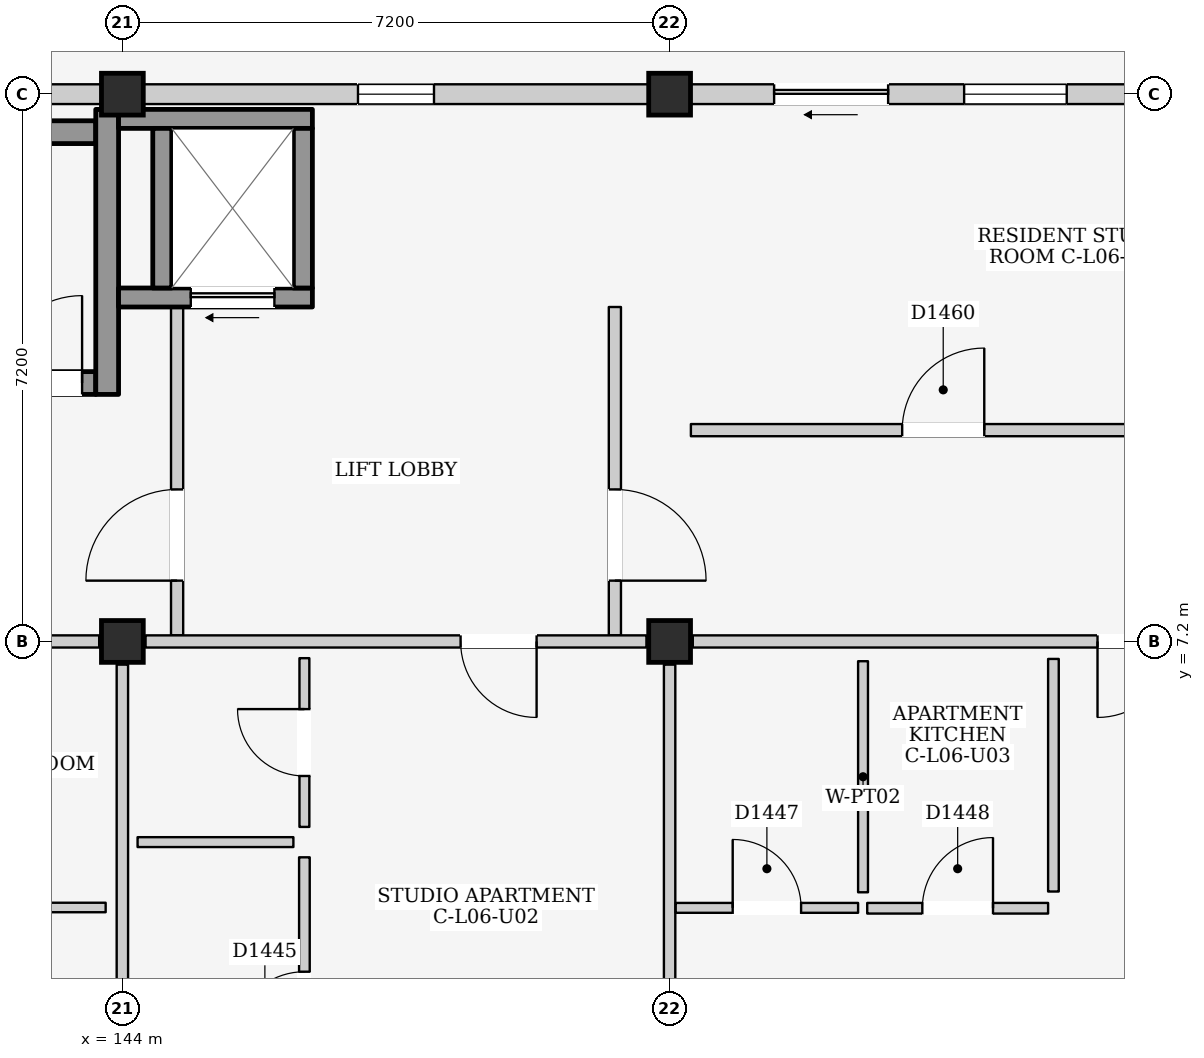
"""IFC4 building model, lengths in metres.
Left out: names, types, materials, properties, quantities, classifications, styles, units other than length and angle.
Written with IfcOpenShell. Run it as: python <this file> out.ifc"""

import sys

from ifc_helpers import new_model, si_unit, direction, frame, frame_2d, origin, origin_2d, place, context, subcontext, project, spatial, rectangle, extrude, element, fill, save


model = new_model("IFC4")
c1 = context("Model", 3, precision=1e-05, world=origin(), true_north=direction((0.0, 1.0)))
c2 = subcontext(c1, "Body", "Model", "MODEL_VIEW")
j1 = project(units=[si_unit("LENGTHUNIT", "METRE"), si_unit("PLANEANGLEUNIT", "RADIAN")], contexts=[c1])
p1 = place(None, origin())
s1 = spatial("IfcSite", under=j1, at=p1, CompositionType="ELEMENT")
p2 = place(p1, origin())
s2 = spatial("IfcBuilding", under=s1, at=p2, CompositionType="ELEMENT")
p3 = place(p2, frame((0.0, 0.0, 21.9)))
s3 = spatial("IfcBuildingStorey", under=s2, at=p3, CompositionType="ELEMENT", Elevation=21.9)
for number, where, z_axis, x_axis in (
    (1, (144.0, 7.2, 0.0), (0.0, 0.0, 1.0), (1.0, 0.0, 0.0)),
    (2, (144.0, 14.4, 0.0), (0.0, 0.0, 1.0), (1.0, 0.0, 0.0)),
    (3, (151.2, 7.2, 0.0), (0.0, 0.0, 1.0), (1.0, 0.0, 0.0)),
    (4, (151.2, 14.4, 0.0), (0.0, 0.0, 1.0), (1.0, 0.0, 0.0)),
):
    element("IfcColumn", number, at=place(p3, frame(where, z_axis=z_axis, x_axis=x_axis)), inside=s3, PredefinedType="COLUMN", context=c2, shape_type="SweptSolid", body=[
        extrude(rectangle(XDim=0.55, YDim=0.55, at=origin_2d()), origin(), (0.0, 0.0, 1.0), 3.2),
    ])
p4 = place(p3, frame((137.075, 14.4, 0.0), z_axis=(0.0, 0.0, 1.0), x_axis=(1.0, 0.0, 0.0)))
e5 = element("IfcWall", 5, at=p4, inside=s3, PredefinedType="ELEMENTEDWALL", context=c2, shape_type="SweptSolid", body=[
    extrude(rectangle(XDim=6.65, YDim=0.26, at=frame_2d((3.325, 0.0))), origin(), (0.0, 0.0, 1.0), 2.365),
])
p5 = place(p4, frame((2.825, 0.0, 1.2)))
e6 = element("IfcOpeningElement", 6, at=p5, cuts=e5, PredefinedType="OPENING", context=c2, shape_type="SweptSolid", body=[
    extrude(rectangle(XDim=1.0, YDim=0.9, at=frame_2d((0.5, 0.45))), frame((0.0, 0.145, 0.0), z_axis=(0.0, -1.0, 0.0), x_axis=(1.0, 0.0, 0.0)), (0.0, 0.0, 1.0), 0.29),
])
p6 = place(p3, frame((144.275, 14.4, 0.0), z_axis=(0.0, 0.0, 1.0), x_axis=(1.0, 0.0, 0.0)))
e7 = element("IfcWall", 7, at=p6, inside=s3, PredefinedType="ELEMENTEDWALL", context=c2, shape_type="SweptSolid", body=[
    extrude(rectangle(XDim=6.65, YDim=0.26, at=frame_2d((3.325, 0.0))), origin(), (0.0, 0.0, 1.0), 2.365),
])
p7 = place(p6, frame((2.825, 0.0, 1.2)))
e8 = element("IfcOpeningElement", 8, at=p7, cuts=e7, PredefinedType="OPENING", context=c2, shape_type="SweptSolid", body=[
    extrude(rectangle(XDim=1.0, YDim=0.9, at=frame_2d((0.5, 0.45))), frame((0.0, 0.145, 0.0), z_axis=(0.0, -1.0, 0.0), x_axis=(1.0, 0.0, 0.0)), (0.0, 0.0, 1.0), 0.29),
])
p8 = place(p3, frame((151.475, 14.4, 0.0), z_axis=(0.0, 0.0, 1.0), x_axis=(1.0, 0.0, 0.0)))
e9 = element("IfcWall", 9, at=p8, inside=s3, PredefinedType="ELEMENTEDWALL", context=c2, shape_type="SweptSolid", body=[
    extrude(rectangle(XDim=6.65, YDim=0.26, at=frame_2d((3.325, 0.0))), origin(), (0.0, 0.0, 1.0), 2.365),
])
p9 = place(p8, frame((1.1, 0.0, 0.0)))
e10 = element("IfcOpeningElement", 10, at=p9, cuts=e9, PredefinedType="OPENING", context=c2, shape_type="SweptSolid", body=[
    extrude(rectangle(XDim=1.5, YDim=2.12, at=frame_2d((0.75, 1.06))), frame((0.0, 0.145, 0.0), z_axis=(0.0, -1.0, 0.0), x_axis=(1.0, 0.0, 0.0)), (0.0, 0.0, 1.0), 0.29),
])
p10 = place(p8, frame((3.6, 0.0, 0.755)))
e11 = element("IfcOpeningElement", 11, at=p10, cuts=e9, PredefinedType="OPENING", context=c2, shape_type="SweptSolid", body=[
    extrude(rectangle(XDim=1.35, YDim=1.5, at=frame_2d((0.675, 0.75))), frame((0.0, 0.145, 0.0), z_axis=(0.0, -1.0, 0.0), x_axis=(1.0, 0.0, 0.0)), (0.0, 0.0, 1.0), 0.29),
])
p11 = place(p3, frame((137.15, 10.6, 0.0), z_axis=(0.0, 0.0, 1.0), x_axis=(1.0, 0.0, 0.0)))
e12 = element("IfcWall", 12, at=p11, inside=s3, PredefinedType="SHEAR", context=c2, shape_type="SweptSolid", body=[
    extrude(rectangle(XDim=6.5, YDim=0.3, at=frame_2d((3.25, 0.0))), origin(), (0.0, 0.0, 1.0), 2.98),
])
p12 = place(p11, frame((5.17, 0.0, 0.0)))
e13 = element("IfcOpeningElement", 13, at=p12, cuts=e12, PredefinedType="OPENING", context=c2, shape_type="SweptSolid", body=[
    extrude(rectangle(XDim=1.15, YDim=2.2, at=frame_2d((0.575, 1.1))), frame((0.0, 0.165, 0.0), z_axis=(0.0, -1.0, 0.0), x_axis=(1.0, 0.0, 0.0)), (0.0, 0.0, 1.0), 0.33),
])
p13 = place(p3, frame((137.15, 13.9, 0.0), z_axis=(0.0, 0.0, 1.0), x_axis=(1.0, 0.0, 0.0)))
e14 = element("IfcWall", 14, at=p13, inside=s3, PredefinedType="SHEAR", context=c2, shape_type="SweptSolid", body=[
    extrude(rectangle(XDim=6.5, YDim=0.3, at=frame_2d((3.25, 0.0))), origin(), (0.0, 0.0, 1.0), 2.98),
])
p14 = place(p3, frame((143.8, 10.45, 0.0), z_axis=(0.0, 0.0, 1.0), x_axis=(0.0, 1.0, 0.0)))
e15 = element("IfcWall", 15, at=p14, inside=s3, PredefinedType="SHEAR", context=c2, shape_type="SweptSolid", body=[
    extrude(rectangle(XDim=3.75, YDim=0.3, at=frame_2d((1.875, 0.0))), origin(), (0.0, 0.0, 1.0), 2.98),
])
p15 = place(p3, frame((144.72, 7.28, 0.0), z_axis=(0.0, 0.0, 1.0), x_axis=(0.0, 1.0, 0.0)))
e16 = element("IfcWall", 16, at=p15, inside=s3, PredefinedType="PARTITIONING", context=c2, shape_type="SweptSolid", body=[
    extrude(rectangle(XDim=4.32, YDim=0.16, at=frame_2d((2.16, 0.0))), origin(), (0.0, 0.0, 1.0), 2.98),
])
p16 = place(p15, frame((0.72, 0.0, 0.0)))
e17 = element("IfcOpeningElement", 17, at=p16, cuts=e16, PredefinedType="OPENING", context=c2, shape_type="SweptSolid", body=[
    extrude(rectangle(XDim=1.2, YDim=2.2, at=frame_2d((0.6, 1.1))), frame((0.0, 0.095, 0.0), z_axis=(0.0, -1.0, 0.0), x_axis=(1.0, 0.0, 0.0)), (0.0, 0.0, 1.0), 0.19),
])
p17 = place(p3, frame((150.48, 7.28, 0.0), z_axis=(0.0, 0.0, 1.0), x_axis=(0.0, 1.0, 0.0)))
e18 = element("IfcWall", 18, at=p17, inside=s3, PredefinedType="PARTITIONING", context=c2, shape_type="SweptSolid", body=[
    extrude(rectangle(XDim=4.32, YDim=0.16, at=frame_2d((2.16, 0.0))), origin(), (0.0, 0.0, 1.0), 2.98),
])
p18 = place(p17, frame((0.72, 0.0, 0.0)))
e19 = element("IfcOpeningElement", 19, at=p18, cuts=e18, PredefinedType="OPENING", context=c2, shape_type="SweptSolid", body=[
    extrude(rectangle(XDim=1.2, YDim=2.2, at=frame_2d((0.6, 1.1))), frame((0.0, 0.095, 0.0), z_axis=(0.0, -1.0, 0.0), x_axis=(1.0, 0.0, 0.0)), (0.0, 0.0, 1.0), 0.19),
])
p19 = place(p3, frame((143.95, 11.725, 0.0), z_axis=(0.0, 0.0, 1.0), x_axis=(1.0, 0.0, 0.0)))
e20 = element("IfcWall", 20, at=p19, inside=s3, PredefinedType="SHEAR", context=c2, shape_type="SweptSolid", body=[
    extrude(rectangle(XDim=2.55, YDim=0.25, at=frame_2d((1.275, 0.0))), origin(), (0.0, 0.0, 1.0), 2.98),
])
p20 = place(p19, frame((0.95, 0.0, 0.0)))
e21 = element("IfcOpeningElement", 21, at=p20, cuts=e20, PredefinedType="OPENING", context=c2, shape_type="SweptSolid", body=[
    extrude(rectangle(XDim=1.1, YDim=2.15, at=frame_2d((0.55, 1.075))), frame((0.0, 0.14, 0.0), z_axis=(0.0, -1.0, 0.0), x_axis=(1.0, 0.0, 0.0)), (0.0, 0.0, 1.0), 0.28),
])
p21 = place(p3, frame((143.95, 14.075, 0.0), z_axis=(0.0, 0.0, 1.0), x_axis=(1.0, 0.0, 0.0)))
e22 = element("IfcWall", 22, at=p21, inside=s3, PredefinedType="SHEAR", context=c2, shape_type="SweptSolid", body=[
    extrude(rectangle(XDim=2.55, YDim=0.25, at=frame_2d((1.275, 0.0))), origin(), (0.0, 0.0, 1.0), 2.98),
])
for number, where, z_axis, x_axis in (
    (23, (144.525, 11.85, 0.0), (0.0, 0.0, 1.0), (0.0, 1.0, 0.0)),
    (24, (146.375, 11.85, 0.0), (0.0, 0.0, 1.0), (0.0, 1.0, 0.0)),
):
    element("IfcWall", number, at=place(p3, frame(where, z_axis=z_axis, x_axis=x_axis)), inside=s3, PredefinedType="SHEAR", context=c2, shape_type="SweptSolid", body=[
        extrude(rectangle(XDim=2.1, YDim=0.25, at=frame_2d((1.05, 0.0))), origin(), (0.0, 0.0, 1.0), 2.98),
    ])
p22 = place(p3, frame((137.105, 7.2, 0.0), z_axis=(0.0, 0.0, 1.0), x_axis=(1.0, 0.0, 0.0)))
e25 = element("IfcWall", 25, at=p22, inside=s3, PredefinedType="PARTITIONING", context=c2, shape_type="SweptSolid", body=[
    extrude(rectangle(XDim=6.59, YDim=0.16, at=frame_2d((3.295, 0.0))), origin(), (0.0, 0.0, 1.0), 2.365),
])
p23 = place(p3, frame((144.0, 0.305, 0.0), z_axis=(0.0, 0.0, 1.0), x_axis=(0.0, 1.0, 0.0)))
e26 = element("IfcWall", 26, at=p23, inside=s3, PredefinedType="PARTITIONING", context=c2, shape_type="SweptSolid", body=[
    extrude(rectangle(XDim=6.59, YDim=0.15, at=frame_2d((3.295, 0.0))), origin(), (0.0, 0.0, 1.0), 2.465),
])
p24 = place(p3, frame((139.72, 3.7, 0.0), z_axis=(0.0, 0.0, 1.0), x_axis=(1.0, 0.0, 0.0)))
e27 = element("IfcWall", 27, at=p24, inside=s3, PredefinedType="PARTITIONING", context=c2, shape_type="SweptSolid", body=[
    extrude(rectangle(XDim=4.06, YDim=0.125, at=frame_2d((2.03, 0.0))), origin(), (0.0, 0.0, 1.0), 2.98),
])
p25 = place(p3, frame((144.305, 7.2, 0.0), z_axis=(0.0, 0.0, 1.0), x_axis=(1.0, 0.0, 0.0)))
e28 = element("IfcWall", 28, at=p25, inside=s3, PredefinedType="PARTITIONING", context=c2, shape_type="SweptSolid", body=[
    extrude(rectangle(XDim=6.59, YDim=0.16, at=frame_2d((3.295, 0.0))), origin(), (0.0, 0.0, 1.0), 2.365),
])
p26 = place(p25, frame((4.145, 0.0, 0.0)))
e29 = element("IfcOpeningElement", 29, at=p26, cuts=e28, PredefinedType="OPENING", context=c2, shape_type="SweptSolid", body=[
    extrude(rectangle(XDim=1.0, YDim=2.15, at=frame_2d((0.5, 1.075))), frame((0.0, 0.095, 0.0), z_axis=(0.0, -1.0, 0.0), x_axis=(1.0, 0.0, 0.0)), (0.0, 0.0, 1.0), 0.19),
])
p27 = place(p3, frame((151.2, 0.305, 0.0), z_axis=(0.0, 0.0, 1.0), x_axis=(0.0, 1.0, 0.0)))
e30 = element("IfcWall", 30, at=p27, inside=s3, PredefinedType="PARTITIONING", context=c2, shape_type="SweptSolid", body=[
    extrude(rectangle(XDim=6.59, YDim=0.15, at=frame_2d((3.295, 0.0))), origin(), (0.0, 0.0, 1.0), 2.465),
])
p28 = place(p3, frame((144.2, 4.56, 0.0), z_axis=(0.0, 0.0, 1.0), x_axis=(1.0, 0.0, 0.0)))
e31 = element("IfcWall", 31, at=p28, inside=s3, PredefinedType="PARTITIONING", context=c2, shape_type="SweptSolid", body=[
    extrude(rectangle(XDim=2.05, YDim=0.13, at=frame_2d((1.025, 0.0))), origin(), (0.0, 0.0, 1.0), 2.98),
])
p29 = place(p3, frame((146.395, 4.76, 0.0), z_axis=(0.0, 0.0, 1.0), x_axis=(0.0, 1.0, 0.0)))
e32 = element("IfcWall", 32, at=p29, inside=s3, PredefinedType="PARTITIONING", context=c2, shape_type="SweptSolid", body=[
    extrude(rectangle(XDim=2.22, YDim=0.13, at=frame_2d((1.11, 0.0))), origin(), (0.0, 0.0, 1.0), 2.98),
])
p30 = place(p29, frame((0.67, 0.0, 0.0)))
e33 = element("IfcOpeningElement", 33, at=p30, cuts=e32, PredefinedType="OPENING", context=c2, shape_type="SweptSolid", body=[
    extrude(rectangle(XDim=0.88, YDim=2.1, at=frame_2d((0.44, 1.05))), frame((0.0, 0.08, 0.0), z_axis=(0.0, -1.0, 0.0), x_axis=(1.0, 0.0, 0.0)), (0.0, 0.0, 1.0), 0.16),
])
p31 = place(p3, frame((146.395, 0.42, 0.0), z_axis=(0.0, 0.0, 1.0), x_axis=(0.0, 1.0, 0.0)))
e34 = element("IfcWall", 34, at=p31, inside=s3, PredefinedType="PARTITIONING", context=c2, shape_type="SweptSolid", body=[
    extrude(rectangle(XDim=3.94, YDim=0.14, at=frame_2d((1.97, 0.0))), origin(), (0.0, 0.0, 1.0), 2.98),
])
p32 = place(p31, frame((1.505, 0.0, 0.0)))
e35 = element("IfcOpeningElement", 35, at=p32, cuts=e34, PredefinedType="OPENING", context=c2, shape_type="SweptSolid", body=[
    extrude(rectangle(XDim=0.93, YDim=2.14, at=frame_2d((0.465, 1.07))), frame((0.0, 0.085, 0.0), z_axis=(0.0, -1.0, 0.0), x_axis=(1.0, 0.0, 0.0)), (0.0, 0.0, 1.0), 0.17),
])
p33 = place(p3, frame((151.505, 7.2, 0.0), z_axis=(0.0, 0.0, 1.0), x_axis=(1.0, 0.0, 0.0)))
e36 = element("IfcWall", 36, at=p33, inside=s3, PredefinedType="PARTITIONING", context=c2, shape_type="SweptSolid", body=[
    extrude(rectangle(XDim=6.59, YDim=0.16, at=frame_2d((3.295, 0.0))), origin(), (0.0, 0.0, 1.0), 2.365),
])
p34 = place(p33, frame((5.325, 0.0, 0.0)))
e37 = element("IfcOpeningElement", 37, at=p34, cuts=e36, PredefinedType="OPENING", context=c2, shape_type="SweptSolid", body=[
    extrude(rectangle(XDim=1.0, YDim=2.15, at=frame_2d((0.5, 1.075))), frame((0.0, 0.095, 0.0), z_axis=(0.0, -1.0, 0.0), x_axis=(1.0, 0.0, 0.0)), (0.0, 0.0, 1.0), 0.19),
])
p35 = place(p3, frame((151.28, 3.695, 0.0), z_axis=(0.0, 0.0, 1.0), x_axis=(1.0, 0.0, 0.0)))
e38 = element("IfcWall", 38, at=p35, inside=s3, PredefinedType="PARTITIONING", context=c2, shape_type="SweptSolid", body=[
    extrude(rectangle(XDim=2.4, YDim=0.13, at=frame_2d((1.2, 0.0))), origin(), (0.0, 0.0, 1.0), 2.98),
])
p36 = place(p35, frame((0.75, 0.0, 0.0)))
e39 = element("IfcOpeningElement", 39, at=p36, cuts=e38, PredefinedType="OPENING", context=c2, shape_type="SweptSolid", body=[
    extrude(rectangle(XDim=0.9, YDim=2.1, at=frame_2d((0.45, 1.05))), frame((0.0, 0.08, 0.0), z_axis=(0.0, -1.0, 0.0), x_axis=(1.0, 0.0, 0.0)), (0.0, 0.0, 1.0), 0.16),
])
p37 = place(p3, frame((153.745, 3.9, 0.0), z_axis=(0.0, 0.0, 1.0), x_axis=(0.0, 1.0, 0.0)))
e40 = element("IfcWall", 40, at=p37, inside=s3, PredefinedType="PARTITIONING", context=c2, shape_type="SweptSolid", body=[
    extrude(rectangle(XDim=3.04, YDim=0.13, at=frame_2d((1.52, 0.0))), origin(), (0.0, 0.0, 1.0), 2.98),
])
p38 = place(p3, frame((153.8, 3.69, 0.0), z_axis=(0.0, 0.0, 1.0), x_axis=(1.0, 0.0, 0.0)))
e41 = element("IfcWall", 41, at=p38, inside=s3, PredefinedType="PARTITIONING", context=c2, shape_type="SweptSolid", body=[
    extrude(rectangle(XDim=2.38, YDim=0.14, at=frame_2d((1.19, 0.0))), origin(), (0.0, 0.0, 1.0), 2.98),
])
p39 = place(p38, frame((0.725, 0.0, 0.0)))
e42 = element("IfcOpeningElement", 42, at=p39, cuts=e41, PredefinedType="OPENING", context=c2, shape_type="SweptSolid", body=[
    extrude(rectangle(XDim=0.93, YDim=2.14, at=frame_2d((0.465, 1.07))), frame((0.0, 0.085, 0.0), z_axis=(0.0, -1.0, 0.0), x_axis=(1.0, 0.0, 0.0)), (0.0, 0.0, 1.0), 0.17),
])
p40 = place(p3, frame((156.25, 3.91, 0.0), z_axis=(0.0, 0.0, 1.0), x_axis=(0.0, 1.0, 0.0)))
e43 = element("IfcWall", 43, at=p40, inside=s3, PredefinedType="PARTITIONING", context=c2, shape_type="SweptSolid", body=[
    extrude(rectangle(XDim=3.06, YDim=0.14, at=frame_2d((1.53, 0.0))), origin(), (0.0, 0.0, 1.0), 2.98),
])
p41 = place(p3, frame((151.48, 9.98, 0.0), z_axis=(0.0, 0.0, 1.0), x_axis=(1.0, 0.0, 0.0)))
e44 = element("IfcWall", 44, at=p41, inside=s3, PredefinedType="PARTITIONING", context=c2, shape_type="SweptSolid", body=[
    extrude(rectangle(XDim=6.64, YDim=0.16, at=frame_2d((3.32, 0.0))), origin(), (0.0, 0.0, 1.0), 2.98),
])
p42 = place(p41, frame((2.78, 0.0, 0.0)))
e45 = element("IfcOpeningElement", 45, at=p42, cuts=e44, PredefinedType="OPENING", context=c2, shape_type="SweptSolid", body=[
    extrude(rectangle(XDim=1.08, YDim=2.22, at=frame_2d((0.54, 1.11))), frame((0.0, 0.095, 0.0), z_axis=(0.0, -1.0, 0.0), x_axis=(1.0, 0.0, 0.0)), (0.0, 0.0, 1.0), 0.19),
])
p43 = place(p7, origin())
e46 = element("IfcWindow", 46, at=p43, inside=s3, PartitioningType="SINGLE_PANEL", PredefinedType="WINDOW", context=c2, shape_type="SweptSolid", body=[
    extrude(rectangle(XDim=1.0, YDim=0.9, at=frame_2d((0.5, 0.45))), frame((0.0, 0.03, 0.0), z_axis=(0.0, -1.0, 0.0), x_axis=(1.0, 0.0, 0.0)), (0.0, 0.0, 1.0), 0.06),
])
fill(e8, e46)
p44 = place(p9, frame((1.5, 0.0, 0.0), z_axis=(0.0, 0.0, 1.0), x_axis=(-1.0, 0.0, 0.0)))
e47 = element("IfcDoor", 47, at=p44, inside=s3, OperationType="SLIDING_TO_LEFT", PredefinedType="DOOR", context=c2, shape_type="SweptSolid", body=[
    extrude(rectangle(XDim=1.5, YDim=2.12, at=frame_2d((0.75, 1.06))), frame((0.0, 0.025, 0.0), z_axis=(0.0, -1.0, 0.0), x_axis=(1.0, 0.0, 0.0)), (0.0, 0.0, 1.0), 0.05),
])
fill(e10, e47)
p45 = place(p10, origin())
e48 = element("IfcWindow", 48, at=p45, inside=s3, PartitioningType="SINGLE_PANEL", PredefinedType="WINDOW", context=c2, shape_type="SweptSolid", body=[
    extrude(rectangle(XDim=1.35, YDim=1.5, at=frame_2d((0.675, 0.75))), frame((0.0, 0.03, 0.0), z_axis=(0.0, -1.0, 0.0), x_axis=(1.0, 0.0, 0.0)), (0.0, 0.0, 1.0), 0.06),
])
fill(e11, e48)
p46 = place(p12, origin())
e49 = element("IfcDoor", 49, at=p46, inside=s3, OperationType="SINGLE_SWING_RIGHT", PredefinedType="DOOR", context=c2, shape_type="SweptSolid", body=[
    extrude(rectangle(XDim=1.15, YDim=2.2, at=frame_2d((0.575, 1.1))), frame((0.0, 0.025, 0.0), z_axis=(0.0, -1.0, 0.0), x_axis=(1.0, 0.0, 0.0)), (0.0, 0.0, 1.0), 0.05),
])
fill(e13, e49)
p47 = place(p16, origin())
e50 = element("IfcDoor", 50, at=p47, inside=s3, OperationType="SINGLE_SWING_LEFT", PredefinedType="DOOR", context=c2, shape_type="SweptSolid", body=[
    extrude(rectangle(XDim=1.2, YDim=2.2, at=frame_2d((0.6, 1.1))), frame((0.0, 0.025, 0.0), z_axis=(0.0, -1.0, 0.0), x_axis=(1.0, 0.0, 0.0)), (0.0, 0.0, 1.0), 0.05),
])
fill(e17, e50)
p48 = place(p18, frame((1.2, 0.0, 0.0), z_axis=(0.0, 0.0, 1.0), x_axis=(-1.0, 0.0, 0.0)))
e51 = element("IfcDoor", 51, at=p48, inside=s3, OperationType="SINGLE_SWING_RIGHT", PredefinedType="DOOR", context=c2, shape_type="SweptSolid", body=[
    extrude(rectangle(XDim=1.2, YDim=2.2, at=frame_2d((0.6, 1.1))), frame((0.0, 0.025, 0.0), z_axis=(0.0, -1.0, 0.0), x_axis=(1.0, 0.0, 0.0)), (0.0, 0.0, 1.0), 0.05),
])
fill(e19, e51)
p49 = place(p20, frame((1.1, 0.0, 0.0), z_axis=(0.0, 0.0, 1.0), x_axis=(-1.0, 0.0, 0.0)))
e52 = element("IfcDoor", 52, at=p49, inside=s3, OperationType="SLIDING_TO_LEFT", PredefinedType="DOOR", context=c2, shape_type="SweptSolid", body=[
    extrude(rectangle(XDim=1.1, YDim=2.15, at=frame_2d((0.55, 1.075))), frame((0.0, 0.025, 0.0), z_axis=(0.0, -1.0, 0.0), x_axis=(1.0, 0.0, 0.0)), (0.0, 0.0, 1.0), 0.05),
])
fill(e21, e52)
p50 = place(p26, frame((1.0, 0.0, 0.0), z_axis=(0.0, 0.0, 1.0), x_axis=(-1.0, 0.0, 0.0)))
e53 = element("IfcDoor", 53, at=p50, inside=s3, OperationType="SINGLE_SWING_LEFT", PredefinedType="DOOR", context=c2, shape_type="SweptSolid", body=[
    extrude(rectangle(XDim=1.0, YDim=2.15, at=frame_2d((0.5, 1.075))), frame((0.0, 0.025, 0.0), z_axis=(0.0, -1.0, 0.0), x_axis=(1.0, 0.0, 0.0)), (0.0, 0.0, 1.0), 0.05),
])
fill(e29, e53)
p51 = place(p30, origin())
e54 = element("IfcDoor", 54, at=p51, inside=s3, OperationType="SINGLE_SWING_RIGHT", PredefinedType="DOOR", context=c2, shape_type="SweptSolid", body=[
    extrude(rectangle(XDim=0.88, YDim=2.1, at=frame_2d((0.44, 1.05))), frame((0.0, 0.025, 0.0), z_axis=(0.0, -1.0, 0.0), x_axis=(1.0, 0.0, 0.0)), (0.0, 0.0, 1.0), 0.05),
])
fill(e33, e54)
p52 = place(p32, origin())
e55 = element("IfcDoor", 55, at=p52, inside=s3, OperationType="SINGLE_SWING_LEFT", PredefinedType="DOOR", context=c2, shape_type="SweptSolid", body=[
    extrude(rectangle(XDim=0.93, YDim=2.14, at=frame_2d((0.465, 1.07))), frame((0.0, 0.025, 0.0), z_axis=(0.0, -1.0, 0.0), x_axis=(1.0, 0.0, 0.0)), (0.0, 0.0, 1.0), 0.05),
])
fill(e35, e55)
p53 = place(p34, frame((1.0, 0.0, 0.0), z_axis=(0.0, 0.0, 1.0), x_axis=(-1.0, 0.0, 0.0)))
e56 = element("IfcDoor", 56, at=p53, inside=s3, OperationType="SINGLE_SWING_RIGHT", PredefinedType="DOOR", context=c2, shape_type="SweptSolid", body=[
    extrude(rectangle(XDim=1.0, YDim=2.15, at=frame_2d((0.5, 1.075))), frame((0.0, 0.025, 0.0), z_axis=(0.0, -1.0, 0.0), x_axis=(1.0, 0.0, 0.0)), (0.0, 0.0, 1.0), 0.05),
])
fill(e37, e56)
p54 = place(p36, origin())
e57 = element("IfcDoor", 57, at=p54, inside=s3, OperationType="SINGLE_SWING_LEFT", PredefinedType="DOOR", context=c2, shape_type="SweptSolid", body=[
    extrude(rectangle(XDim=0.9, YDim=2.1, at=frame_2d((0.45, 1.05))), frame((0.0, 0.025, 0.0), z_axis=(0.0, -1.0, 0.0), x_axis=(1.0, 0.0, 0.0)), (0.0, 0.0, 1.0), 0.05),
])
fill(e39, e57)
p55 = place(p39, origin())
e58 = element("IfcDoor", 58, at=p55, inside=s3, OperationType="SINGLE_SWING_RIGHT", PredefinedType="DOOR", context=c2, shape_type="SweptSolid", body=[
    extrude(rectangle(XDim=0.93, YDim=2.14, at=frame_2d((0.465, 1.07))), frame((0.0, 0.025, 0.0), z_axis=(0.0, -1.0, 0.0), x_axis=(1.0, 0.0, 0.0)), (0.0, 0.0, 1.0), 0.05),
])
fill(e42, e58)
p56 = place(p42, origin())
e59 = element("IfcDoor", 59, at=p56, inside=s3, OperationType="SINGLE_SWING_RIGHT", PredefinedType="DOOR", context=c2, shape_type="SweptSolid", body=[
    extrude(rectangle(XDim=1.08, YDim=2.22, at=frame_2d((0.54, 1.11))), frame((0.0, 0.025, 0.0), z_axis=(0.0, -1.0, 0.0), x_axis=(1.0, 0.0, 0.0)), (0.0, 0.0, 1.0), 0.05),
])
fill(e45, e59)
save(model, sys.argv[1])
